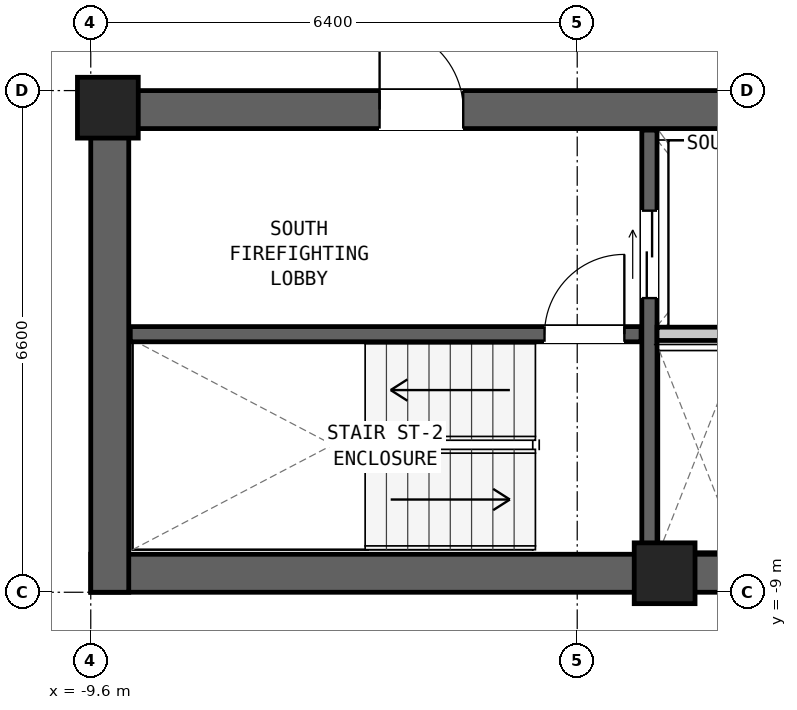
"""IFC4 building model, lengths in metres.
Left out: names, types, materials, properties, quantities, classifications, styles, units other than length and angle.
Written with IfcOpenShell. Run it as: python <this file> out.ifc"""

import sys

from ifc_helpers import new_model, si_unit, direction, frame, frame_2d, origin, origin_2d, place, context, subcontext, project, spatial, rectangle, extrude, element, fill, save


model = new_model("IFC4")
c1 = context("Model", 3, precision=1e-05, world=origin(), true_north=direction((0.0, 1.0)))
c2 = subcontext(c1, "Body", "Model", "MODEL_VIEW")
j1 = project(units=[si_unit("LENGTHUNIT", "METRE"), si_unit("PLANEANGLEUNIT", "RADIAN")], contexts=[c1])
p1 = place(None, origin())
s1 = spatial("IfcSite", under=j1, at=p1, CompositionType="ELEMENT")
p2 = place(p1, origin())
s2 = spatial("IfcBuilding", under=s1, at=p2, CompositionType="ELEMENT")
p3 = place(p2, frame((0.0, 0.0, 131.1)))
s3 = spatial("IfcBuildingStorey", under=s2, at=p3, CompositionType="ELEMENT", Elevation=131.1)
p4 = place(p3, frame((-9.6, -8.75, 0.0), z_axis=(0.0, 0.0, 1.0), x_axis=(1.0, 0.0, 0.0)))
e1 = element("IfcWall", 1, at=p4, inside=s3, PredefinedType="SHEAR", context=c2, shape_type="SweptSolid", body=[
    extrude(rectangle(XDim=19.2, YDim=0.5, at=frame_2d((9.6, 0.0))), origin(), (0.0, 0.0, 1.0), 3.05),
])
p5 = place(p3, frame((-9.6, -2.65, 0.0), z_axis=(0.0, 0.0, 1.0), x_axis=(1.0, 0.0, 0.0)))
e2 = element("IfcWall", 2, at=p5, inside=s3, PredefinedType="SHEAR", context=c2, shape_type="SweptSolid", body=[
    extrude(rectangle(XDim=19.2, YDim=0.5, at=frame_2d((9.6, 0.0))), origin(), (0.0, 0.0, 1.0), 3.05),
])
p6 = place(p5, frame((3.8, 0.0, 0.0)))
e3 = element("IfcOpeningElement", 3, at=p6, cuts=e2, PredefinedType="OPENING", context=c2, shape_type="SweptSolid", body=[
    extrude(rectangle(XDim=1.1, YDim=2.08, at=frame_2d((0.55, 1.04))), frame((0.0, 0.262, 0.0), z_axis=(0.0, -1.0, 0.0), x_axis=(1.0, 0.0, 0.0)), (0.0, 0.0, 1.0), 0.524),
])
p7 = place(p5, frame((13.0, 0.0, 0.0)))
e4 = element("IfcOpeningElement", 4, at=p7, cuts=e2, PredefinedType="OPENING", context=c2, shape_type="SweptSolid", body=[
    extrude(rectangle(XDim=1.6, YDim=2.12, at=frame_2d((0.8, 1.06))), frame((0.0, 0.262, 0.0), z_axis=(0.0, -1.0, 0.0), x_axis=(1.0, 0.0, 0.0)), (0.0, 0.0, 1.0), 0.524),
])
p8 = place(p3, frame((-9.35, -9.0, 0.0), z_axis=(0.0, 0.0, 1.0), x_axis=(0.0, 1.0, 0.0)))
e5 = element("IfcWall", 5, at=p8, inside=s3, PredefinedType="SHEAR", context=c2, shape_type="SweptSolid", body=[
    extrude(rectangle(XDim=6.6, YDim=0.5, at=frame_2d((3.3, 0.0))), origin(), (0.0, 0.0, 1.0), 3.05),
])
for number, where, z_axis, x_axis in (
    (6, (-9.375, -2.625, 0.0), (0.0, 0.0, 1.0), (1.0, 0.0, 0.0)),
    (7, (-2.05, -8.75, 0.0), (0.0, 0.0, 1.0), (1.0, 0.0, 0.0)),
):
    element("IfcColumn", number, at=place(p3, frame(where, z_axis=z_axis, x_axis=x_axis)), inside=s3, PredefinedType="COLUMN", context=c2, shape_type="SweptSolid", body=[
        extrude(rectangle(XDim=0.8, YDim=0.8, at=origin_2d()), origin(), (0.0, 0.0, 1.0), 3.05),
    ])
p9 = place(p3, frame((-9.08, -5.605, 0.0), z_axis=(0.0, 0.0, 1.0), x_axis=(1.0, 0.0, 0.0)))
e8 = element("IfcWall", 8, at=p9, inside=s3, PredefinedType="SHEAR", context=c2, shape_type="SweptSolid", body=[
    extrude(rectangle(XDim=6.72, YDim=0.2, at=frame_2d((3.36, 0.0))), origin(), (0.0, 0.0, 1.0), 2.83),
])
p10 = place(p9, frame((5.45, 0.0, 0.0)))
e9 = element("IfcOpeningElement", 9, at=p10, cuts=e8, PredefinedType="OPENING", context=c2, shape_type="SweptSolid", body=[
    extrude(rectangle(XDim=1.05, YDim=2.08, at=frame_2d((0.525, 1.04))), frame((0.0, 0.112, 0.0), z_axis=(0.0, -1.0, 0.0), x_axis=(1.0, 0.0, 0.0)), (0.0, 0.0, 1.0), 0.224),
])
p11 = place(p3, frame((-2.25, -8.48, 0.0), z_axis=(0.0, 0.0, 1.0), x_axis=(0.0, 1.0, 0.0)))
e10 = element("IfcWall", 10, at=p11, inside=s3, PredefinedType="SHEAR", context=c2, shape_type="SweptSolid", body=[
    extrude(rectangle(XDim=5.56, YDim=0.2, at=frame_2d((2.78, 0.0))), origin(), (0.0, 0.0, 1.0), 2.83),
])
p12 = place(p11, frame((3.35, 0.0, 0.0)))
e11 = element("IfcOpeningElement", 11, at=p12, cuts=e10, PredefinedType="OPENING", context=c2, shape_type="SweptSolid", body=[
    extrude(rectangle(XDim=1.15, YDim=2.08, at=frame_2d((0.575, 1.04))), frame((0.0, 0.112, 0.0), z_axis=(0.0, -1.0, 0.0), x_axis=(1.0, 0.0, 0.0)), (0.0, 0.0, 1.0), 0.224),
])
p13 = place(p3, frame((-2.15, -5.6, 0.0), z_axis=(0.0, 0.0, 1.0), x_axis=(1.0, 0.0, 0.0)))
e12 = element("IfcWall", 12, at=p13, inside=s3, PredefinedType="PARTITIONING", context=c2, shape_type="SweptSolid", body=[
    extrude(rectangle(XDim=1.97, YDim=0.175, at=frame_2d((0.985, 0.0))), origin(), (0.0, 0.0, 1.0), 2.83),
])
p14 = place(p10, origin())
e13 = element("IfcDoor", 13, at=p14, inside=s3, OperationType="SINGLE_SWING_RIGHT", PredefinedType="DOOR", context=c2, shape_type="SweptSolid", body=[
    extrude(rectangle(XDim=1.05, YDim=2.08, at=frame_2d((0.525, 1.04))), frame((0.0, 0.025, 0.0), z_axis=(0.0, -1.0, 0.0), x_axis=(1.0, 0.0, 0.0)), (0.0, 0.0, 1.0), 0.05),
])
fill(e9, e13)
p15 = place(p6, origin())
e14 = element("IfcDoor", 14, at=p15, inside=s3, OperationType="SINGLE_SWING_LEFT", PredefinedType="DOOR", context=c2, shape_type="SweptSolid", body=[
    extrude(rectangle(XDim=1.1, YDim=2.08, at=frame_2d((0.55, 1.04))), frame((0.0, 0.025, 0.0), z_axis=(0.0, -1.0, 0.0), x_axis=(1.0, 0.0, 0.0)), (0.0, 0.0, 1.0), 0.05),
])
fill(e3, e14)
p16 = place(p12, origin())
e15 = element("IfcDoor", 15, at=p16, inside=s3, OperationType="DOUBLE_DOOR_SLIDING", PredefinedType="DOOR", context=c2, shape_type="SweptSolid", body=[
    extrude(rectangle(XDim=1.15, YDim=2.08, at=frame_2d((0.575, 1.04))), frame((0.0, 0.025, 0.0), z_axis=(0.0, -1.0, 0.0), x_axis=(1.0, 0.0, 0.0)), (0.0, 0.0, 1.0), 0.05),
])
fill(e11, e15)
save(model, sys.argv[1])
